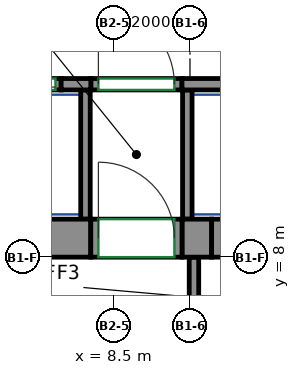
"""IFC4 building model, lengths in metres.
Left out: names, types, materials, properties, quantities, classifications, styles, units other than length and angle.
Written with IfcOpenShell. Run it as: python <this file> out.ifc"""

import sys

from ifc_helpers import new_model, si_unit, direction, frame, frame_2d, origin, place, context, subcontext, project, spatial, rectangle, extrude, source, transform, mapped, element, fill, save


model = new_model("IFC4")
c1 = context("Model", 3, precision=1e-05, world=origin(), true_north=direction((0.0, 1.0)))
c2 = subcontext(c1, "Body", "Model", "MODEL_VIEW")
j1 = project(units=[si_unit("LENGTHUNIT", "METRE"), si_unit("PLANEANGLEUNIT", "RADIAN")], contexts=[c1])
p1 = place(None, origin())
s1 = spatial("IfcSite", under=j1, at=p1, CompositionType="ELEMENT")
p2 = place(p1, origin())
s2 = spatial("IfcBuilding", under=s1, at=p2, CompositionType="ELEMENT")
p3 = place(p2, frame((0.0, 0.0, 35.0)))
s3 = spatial("IfcBuildingStorey", under=s2, at=p3, CompositionType="ELEMENT", Elevation=35.0)
m1 = source(origin(), c2, "Body", "SweptSolid", [
    extrude(rectangle(XDim=14.18, YDim=1.0, at=frame_2d((7.09, 0.0))), origin(), (0.0, 0.0, 1.0), 3.72),
])
p4 = place(p3, frame((-6.29, 8.5, 0.0), z_axis=(0.0, 0.0, 1.0), x_axis=(1.0, 0.0, 0.0)))
e1 = element("IfcWall", 1, at=p4, inside=s3, PredefinedType="SHEAR", context=c2, shape_type="MappedRepresentation", body=[
    mapped(m1, transform((0.0, 0.0, 0.0))),
])
m2 = source(origin(), c2, "Body", "SweptSolid", [
    extrude(rectangle(XDim=0.78, YDim=1.0, at=frame_2d((0.39, 0.0))), origin(), (0.0, 0.0, 1.0), 3.72),
])
p5 = place(p3, frame((10.29, 8.5, 0.0), z_axis=(0.0, 0.0, 1.0), x_axis=(1.0, 0.0, 0.0)))
e2 = element("IfcWall", 2, at=p5, inside=s3, PredefinedType="SHEAR", context=c2, shape_type="MappedRepresentation", body=[
    mapped(m2, transform((0.0, 0.0, 0.0))),
])
m3 = source(origin(), c2, "Body", "SweptSolid", [
    extrude(rectangle(XDim=0.78, YDim=0.3, at=frame_2d((0.39, 0.0))), origin(), (0.0, 0.0, 1.0), 3.72),
])
p6 = place(p3, frame((7.11, 12.55, 0.0), z_axis=(0.0, 0.0, 1.0), x_axis=(1.0, 0.0, 0.0)))
e3 = element("IfcWall", 3, at=p6, inside=s3, PredefinedType="SHEAR", context=c2, shape_type="MappedRepresentation", body=[
    mapped(m3, transform((0.0, 0.0, 0.0))),
])
m4 = source(origin(), c2, "Body", "SweptSolid", [
    extrude(rectangle(XDim=2.82, YDim=0.3, at=frame_2d((1.41, 0.0))), origin(), (0.0, 0.0, 1.0), 3.72),
])
p7 = place(p3, frame((10.29, 12.55, 0.0), z_axis=(0.0, 0.0, 1.0), x_axis=(1.0, 0.0, 0.0)))
e4 = element("IfcWall", 4, at=p7, inside=s3, PredefinedType="SHEAR", context=c2, shape_type="MappedRepresentation", body=[
    mapped(m4, transform((0.0, 0.0, 0.0))),
])
m5 = source(origin(), c2, "Body", "SweptSolid", [
    extrude(rectangle(XDim=1.4, YDim=0.3, at=frame_2d((0.7, 0.0))), origin(), (0.0, 0.0, 1.0), 3.72),
])
p8 = place(p3, frame((5.71, 12.55, 0.0), z_axis=(0.0, 0.0, 1.0), x_axis=(1.0, 0.0, 0.0)))
e5 = element("IfcWall", 5, at=p8, inside=s3, PredefinedType="PARTITIONING", context=c2, shape_type="MappedRepresentation", body=[
    mapped(m5, transform((0.0, 0.0, 0.0))),
])
p9 = place(p8, frame((0.15, 0.0, 0.0)))
e6 = element("IfcOpeningElement", 6, at=p9, cuts=e5, PredefinedType="OPENING", context=c2, shape_type="SweptSolid", body=[
    extrude(rectangle(XDim=1.1, YDim=2.1, at=frame_2d((0.55, 1.05))), frame((0.0, 0.16, 0.0), z_axis=(0.0, -1.0, 0.0), x_axis=(1.0, 0.0, 0.0)), (0.0, 0.0, 1.0), 0.32),
])
m6 = source(origin(), c2, "Body", "SweptSolid", [
    extrude(rectangle(XDim=2.4, YDim=0.3, at=frame_2d((1.2, 0.0))), origin(), (0.0, 0.0, 1.0), 3.72),
])
p10 = place(p3, frame((7.89, 12.55, 0.0), z_axis=(0.0, 0.0, 1.0), x_axis=(1.0, 0.0, 0.0)))
e7 = element("IfcWall", 7, at=p10, inside=s3, PredefinedType="PARTITIONING", context=c2, shape_type="MappedRepresentation", body=[
    mapped(m6, transform((0.0, 0.0, 0.0))),
])
p11 = place(p10, frame((0.2, 0.0, 0.0)))
e8 = element("IfcOpeningElement", 8, at=p11, cuts=e7, PredefinedType="OPENING", context=c2, shape_type="SweptSolid", body=[
    extrude(rectangle(XDim=2.0, YDim=2.1, at=frame_2d((1.0, 1.05))), frame((0.0, 0.16, 0.0), z_axis=(0.0, -1.0, 0.0), x_axis=(1.0, 0.0, 0.0)), (0.0, 0.0, 1.0), 0.32),
])
m7 = source(origin(), c2, "Body", "SweptSolid", [
    extrude(rectangle(XDim=2.65, YDim=0.25, at=frame_2d((1.325, 0.0))), origin(), (0.0, 0.0, 1.0), 3.72),
])
p12 = place(p3, frame((10.605, 5.35, 0.0), z_axis=(0.0, 0.0, 1.0), x_axis=(0.0, 1.0, 0.0)))
e9 = element("IfcWall", 9, at=p12, inside=s3, PredefinedType="PARTITIONING", context=c2, shape_type="MappedRepresentation", body=[
    mapped(m7, transform((0.0, 0.0, 0.0))),
])
m8 = source(origin(), c2, "Body", "SweptSolid", [
    extrude(rectangle(XDim=3.4, YDim=0.25, at=frame_2d((1.7, 0.0))), origin(), (0.0, 0.0, 1.0), 3.72),
])
for number, where, z_axis, x_axis in (
    (10, (10.43, 9.0, 0.0), (0.0, 0.0, 1.0), (0.0, 1.0, 0.0)),
    (11, (7.75, 9.0, 0.0), (0.0, 0.0, 1.0), (0.0, 1.0, 0.0)),
):
    element("IfcWall", number, at=place(p3, frame(where, z_axis=z_axis, x_axis=x_axis)), inside=s3, PredefinedType="PARTITIONING", context=c2, shape_type="MappedRepresentation", body=[
        mapped(m8, transform((0.0, 0.0, 0.0))),
    ])
m9 = source(origin(), c2, "Body", "SweptSolid", [
    extrude(rectangle(XDim=2.4, YDim=1.0, at=frame_2d((1.2, 0.0))), origin(), (0.0, 0.0, 1.0), 2.7),
])
p13 = place(p3, frame((7.89, 8.5, 0.0), z_axis=(0.0, 0.0, 1.0), x_axis=(1.0, 0.0, 0.0)))
e12 = element("IfcWall", 12, at=p13, inside=s3, PredefinedType="PARTITIONING", context=c2, shape_type="MappedRepresentation", body=[
    mapped(m9, transform((0.0, 0.0, 0.0))),
])
p14 = place(p13, frame((0.2, 0.0, 0.0)))
e13 = element("IfcOpeningElement", 13, at=p14, cuts=e12, PredefinedType="OPENING", context=c2, shape_type="SweptSolid", body=[
    extrude(rectangle(XDim=2.0, YDim=2.1, at=frame_2d((1.0, 1.05))), frame((0.0, 0.51, 0.0), z_axis=(0.0, -1.0, 0.0), x_axis=(1.0, 0.0, 0.0)), (0.0, 0.0, 1.0), 1.02),
])
m10 = source(origin(), c2, "Body", "SweptSolid", [
    extrude(rectangle(XDim=1.4, YDim=1.0, at=frame_2d((0.7, 0.0))), origin(), (0.0, 0.0, 1.0), 2.7),
])
p15 = place(p3, frame((11.07, 8.5, 0.0), z_axis=(0.0, 0.0, 1.0), x_axis=(1.0, 0.0, 0.0)))
e14 = element("IfcWall", 14, at=p15, inside=s3, PredefinedType="PARTITIONING", context=c2, shape_type="MappedRepresentation", body=[
    mapped(m10, transform((0.0, 0.0, 0.0))),
])
p16 = place(p15, frame((0.25, 0.0, 0.0)))
e15 = element("IfcOpeningElement", 15, at=p16, cuts=e14, PredefinedType="OPENING", context=c2, shape_type="SweptSolid", body=[
    extrude(rectangle(XDim=0.9, YDim=2.1, at=frame_2d((0.45, 1.05))), frame((0.0, 0.51, 0.0), z_axis=(0.0, -1.0, 0.0), x_axis=(1.0, 0.0, 0.0)), (0.0, 0.0, 1.0), 1.02),
])
p17 = place(p11, origin())
e16 = element("IfcDoor", 16, at=p17, inside=s3, OperationType="DOUBLE_DOOR_SINGLE_SWING", PredefinedType="DOOR", context=c2, shape_type="SweptSolid", body=[
    extrude(rectangle(XDim=2.0, YDim=2.1, at=frame_2d((1.0, 1.05))), frame((0.0, 0.025, 0.0), z_axis=(0.0, -1.0, 0.0), x_axis=(1.0, 0.0, 0.0)), (0.0, 0.0, 1.0), 0.05),
])
fill(e8, e16)
p18 = place(p14, origin())
e17 = element("IfcDoor", 17, at=p18, inside=s3, OperationType="DOUBLE_DOOR_SINGLE_SWING", PredefinedType="DOOR", context=c2, shape_type="SweptSolid", body=[
    extrude(rectangle(XDim=2.0, YDim=2.1, at=frame_2d((1.0, 1.05))), frame((0.0, 0.405, 0.0), z_axis=(0.0, -1.0, 0.0), x_axis=(1.0, 0.0, 0.0)), (0.0, 0.0, 1.0), 0.05),
])
fill(e13, e17)
p19 = place(p9, origin())
e18 = element("IfcDoor", 18, at=p19, inside=s3, OperationType="DOUBLE_DOOR_SLIDING", PredefinedType="DOOR", context=c2, shape_type="SweptSolid", body=[
    extrude(rectangle(XDim=1.1, YDim=2.1, at=frame_2d((0.55, 1.05))), frame((0.0, 0.025, 0.0), z_axis=(0.0, -1.0, 0.0), x_axis=(1.0, 0.0, 0.0)), (0.0, 0.0, 1.0), 0.05),
])
fill(e6, e18)
save(model, sys.argv[1])
